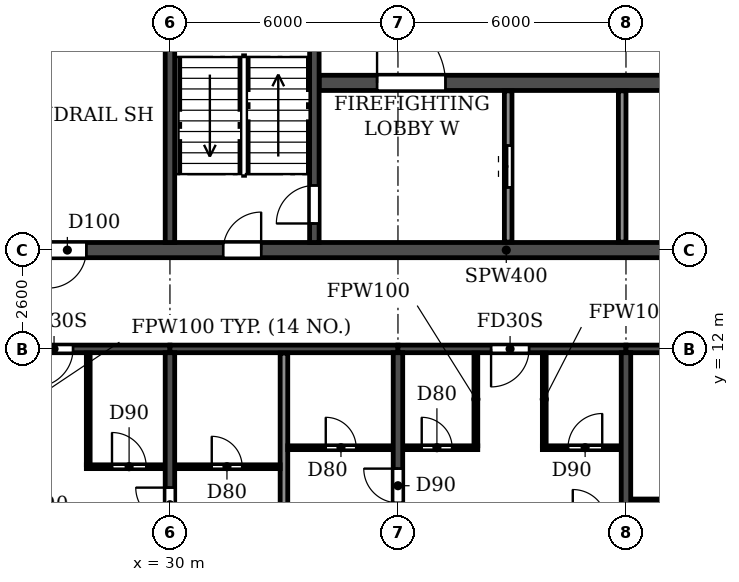
"""IFC4 building model, lengths in metres.
Left out: names, types, materials, properties, quantities, classifications, styles, units other than length and angle.
Written with IfcOpenShell. Run it as: python <this file> out.ifc"""

import sys

from ifc_helpers import new_model, si_unit, direction, frame, frame_2d, origin, place, context, subcontext, project, spatial, rectangle, extrude, element, fill, save


model = new_model("IFC4")
c1 = context("Model", 3, precision=1e-05, world=origin(), true_north=direction((0.0, 1.0)))
c2 = subcontext(c1, "Body", "Model", "MODEL_VIEW")
j1 = project(units=[si_unit("LENGTHUNIT", "METRE"), si_unit("PLANEANGLEUNIT", "RADIAN")], contexts=[c1])
p1 = place(None, origin())
s1 = spatial("IfcSite", under=j1, at=p1, CompositionType="ELEMENT")
p2 = place(p1, origin())
s2 = spatial("IfcBuilding", under=s1, at=p2, CompositionType="ELEMENT")
p3 = place(p2, frame((0.0, 0.0, 208.2)))
s3 = spatial("IfcBuildingStorey", under=s2, at=p3, CompositionType="ELEMENT", Elevation=208.2)
p4 = place(p3, frame((30.0, 0.2, 0.0), z_axis=(0.0, 0.0, 1.0), x_axis=(0.0, 1.0, 0.0)))
e1 = element("IfcWall", 1, at=p4, inside=s3, PredefinedType="SHEAR", context=c2, shape_type="SweptSolid", body=[
    extrude(rectangle(XDim=11.7, YDim=0.25, at=frame_2d((5.85, 0.0))), origin(), (0.0, 0.0, 1.0), 3.0),
])
p5 = place(p4, frame((7.25, 0.0, 0.0)))
e2 = element("IfcOpeningElement", 2, at=p5, cuts=e1, PredefinedType="OPENING", context=c2, shape_type="SweptSolid", body=[
    extrude(rectangle(XDim=0.9, YDim=2.1, at=frame_2d((0.45, 1.05))), frame((0.0, 0.135, 0.0), z_axis=(0.0, -1.0, 0.0), x_axis=(1.0, 0.0, 0.0)), (0.0, 0.0, 1.0), 0.27),
])
p6 = place(p3, frame((36.0, 0.2, 0.0), z_axis=(0.0, 0.0, 1.0), x_axis=(0.0, 1.0, 0.0)))
e3 = element("IfcWall", 3, at=p6, inside=s3, PredefinedType="SHEAR", context=c2, shape_type="SweptSolid", body=[
    extrude(rectangle(XDim=11.7, YDim=0.25, at=frame_2d((5.85, 0.0))), origin(), (0.0, 0.0, 1.0), 3.0),
])
p7 = place(p6, frame((7.75, 0.0, 0.0)))
e4 = element("IfcOpeningElement", 4, at=p7, cuts=e3, PredefinedType="OPENING", context=c2, shape_type="SweptSolid", body=[
    extrude(rectangle(XDim=0.9, YDim=2.1, at=frame_2d((0.45, 1.05))), frame((0.0, 0.135, 0.0), z_axis=(0.0, -1.0, 0.0), x_axis=(1.0, 0.0, 0.0)), (0.0, 0.0, 1.0), 0.27),
])
p8 = place(p3, frame((42.0, 0.2, 0.0), z_axis=(0.0, 0.0, 1.0), x_axis=(0.0, 1.0, 0.0)))
e5 = element("IfcWall", 5, at=p8, inside=s3, PredefinedType="SHEAR", context=c2, shape_type="SweptSolid", body=[
    extrude(rectangle(XDim=11.7, YDim=0.25, at=frame_2d((5.85, 0.0))), origin(), (0.0, 0.0, 1.0), 3.0),
])
p9 = place(p3, frame((24.0, 12.0, 0.0), z_axis=(0.0, 0.0, 1.0), x_axis=(1.0, 0.0, 0.0)))
e6 = element("IfcWall", 6, at=p9, inside=s3, PredefinedType="SHEAR", context=c2, shape_type="SweptSolid", body=[
    extrude(rectangle(XDim=6.0, YDim=0.2, at=frame_2d((3.0, 0.0))), origin(), (0.0, 0.0, 1.0), 2.4),
])
p10 = place(p9, frame((2.45, 0.0, 0.0)))
e7 = element("IfcOpeningElement", 7, at=p10, cuts=e6, PredefinedType="OPENING", context=c2, shape_type="SweptSolid", body=[
    extrude(rectangle(XDim=1.0, YDim=2.1, at=frame_2d((0.5, 1.05))), frame((0.0, 0.11, 0.0), z_axis=(0.0, -1.0, 0.0), x_axis=(1.0, 0.0, 0.0)), (0.0, 0.0, 1.0), 0.22),
])
p11 = place(p3, frame((30.0, 12.0, 0.0), z_axis=(0.0, 0.0, 1.0), x_axis=(1.0, 0.0, 0.0)))
e8 = element("IfcWall", 8, at=p11, inside=s3, PredefinedType="SHEAR", context=c2, shape_type="SweptSolid", body=[
    extrude(rectangle(XDim=6.0, YDim=0.2, at=frame_2d((3.0, 0.0))), origin(), (0.0, 0.0, 1.0), 2.4),
])
p12 = place(p3, frame((36.0, 12.0, 0.0), z_axis=(0.0, 0.0, 1.0), x_axis=(1.0, 0.0, 0.0)))
e9 = element("IfcWall", 9, at=p12, inside=s3, PredefinedType="SHEAR", context=c2, shape_type="SweptSolid", body=[
    extrude(rectangle(XDim=6.0, YDim=0.2, at=frame_2d((3.0, 0.0))), origin(), (0.0, 0.0, 1.0), 2.4),
])
p13 = place(p12, frame((2.45, 0.0, 0.0)))
e10 = element("IfcOpeningElement", 10, at=p13, cuts=e9, PredefinedType="OPENING", context=c2, shape_type="SweptSolid", body=[
    extrude(rectangle(XDim=1.0, YDim=2.1, at=frame_2d((0.5, 1.05))), frame((0.0, 0.11, 0.0), z_axis=(0.0, -1.0, 0.0), x_axis=(1.0, 0.0, 0.0)), (0.0, 0.0, 1.0), 0.22),
])
p14 = place(p3, frame((42.0, 12.0, 0.0), z_axis=(0.0, 0.0, 1.0), x_axis=(1.0, 0.0, 0.0)))
e11 = element("IfcWall", 11, at=p14, inside=s3, PredefinedType="SHEAR", context=c2, shape_type="SweptSolid", body=[
    extrude(rectangle(XDim=6.0, YDim=0.2, at=frame_2d((3.0, 0.0))), origin(), (0.0, 0.0, 1.0), 2.4),
])
p15 = place(p14, frame((2.45, 0.0, 0.0)))
e12 = element("IfcOpeningElement", 12, at=p15, cuts=e11, PredefinedType="OPENING", context=c2, shape_type="SweptSolid", body=[
    extrude(rectangle(XDim=1.0, YDim=2.1, at=frame_2d((0.5, 1.05))), frame((0.0, 0.11, 0.0), z_axis=(0.0, -1.0, 0.0), x_axis=(1.0, 0.0, 0.0)), (0.0, 0.0, 1.0), 0.22),
])
p16 = place(p3, frame((18.2, 14.6, 0.0), z_axis=(0.0, 0.0, 1.0), x_axis=(1.0, 0.0, 0.0)))
e13 = element("IfcWall", 13, at=p16, inside=s3, PredefinedType="SOLIDWALL", context=c2, shape_type="SweptSolid", body=[
    extrude(rectangle(XDim=65.6, YDim=0.4, at=frame_2d((32.8, 0.0))), origin(), (0.0, 0.0, 1.0), 3.0),
])
p17 = place(p16, frame((0.7, 0.0, 0.0)))
e14 = element("IfcOpeningElement", 14, at=p17, cuts=e13, PredefinedType="OPENING", context=c2, shape_type="SweptSolid", body=[
    extrude(rectangle(XDim=1.0, YDim=2.1, at=frame_2d((0.5, 1.05))), frame((0.0, 0.21, 0.0), z_axis=(0.0, -1.0, 0.0), x_axis=(1.0, 0.0, 0.0)), (0.0, 0.0, 1.0), 0.42),
])
p18 = place(p16, frame((8.6, 0.0, 0.0)))
e15 = element("IfcOpeningElement", 15, at=p18, cuts=e13, PredefinedType="OPENING", context=c2, shape_type="SweptSolid", body=[
    extrude(rectangle(XDim=1.0, YDim=2.1, at=frame_2d((0.5, 1.05))), frame((0.0, 0.21, 0.0), z_axis=(0.0, -1.0, 0.0), x_axis=(1.0, 0.0, 0.0)), (0.0, 0.0, 1.0), 0.42),
])
p19 = place(p16, frame((13.2, 0.0, 0.0)))
e16 = element("IfcOpeningElement", 16, at=p19, cuts=e13, PredefinedType="OPENING", context=c2, shape_type="SweptSolid", body=[
    extrude(rectangle(XDim=1.0, YDim=2.1, at=frame_2d((0.5, 1.05))), frame((0.0, 0.21, 0.0), z_axis=(0.0, -1.0, 0.0), x_axis=(1.0, 0.0, 0.0)), (0.0, 0.0, 1.0), 0.42),
])
p20 = place(p16, frame((27.1, 0.0, 0.0)))
e17 = element("IfcOpeningElement", 17, at=p20, cuts=e13, PredefinedType="OPENING", context=c2, shape_type="SweptSolid", body=[
    extrude(rectangle(XDim=1.0, YDim=2.1, at=frame_2d((0.5, 1.05))), frame((0.0, 0.21, 0.0), z_axis=(0.0, -1.0, 0.0), x_axis=(1.0, 0.0, 0.0)), (0.0, 0.0, 1.0), 0.42),
])
p21 = place(p16, frame((32.3, 0.0, 0.0)))
e18 = element("IfcOpeningElement", 18, at=p21, cuts=e13, PredefinedType="OPENING", context=c2, shape_type="SweptSolid", body=[
    extrude(rectangle(XDim=1.0, YDim=2.1, at=frame_2d((0.5, 1.05))), frame((0.0, 0.21, 0.0), z_axis=(0.0, -1.0, 0.0), x_axis=(1.0, 0.0, 0.0)), (0.0, 0.0, 1.0), 0.42),
])
p22 = place(p16, frame((34.9, 0.0, 0.0)))
e19 = element("IfcOpeningElement", 19, at=p22, cuts=e13, PredefinedType="OPENING", context=c2, shape_type="SweptSolid", body=[
    extrude(rectangle(XDim=1.0, YDim=2.1, at=frame_2d((0.5, 1.05))), frame((0.0, 0.21, 0.0), z_axis=(0.0, -1.0, 0.0), x_axis=(1.0, 0.0, 0.0)), (0.0, 0.0, 1.0), 0.42),
])
p23 = place(p16, frame((38.8, 0.0, 0.0)))
e20 = element("IfcOpeningElement", 20, at=p23, cuts=e13, PredefinedType="OPENING", context=c2, shape_type="SweptSolid", body=[
    extrude(rectangle(XDim=1.0, YDim=2.1, at=frame_2d((0.5, 1.05))), frame((0.0, 0.21, 0.0), z_axis=(0.0, -1.0, 0.0), x_axis=(1.0, 0.0, 0.0)), (0.0, 0.0, 1.0), 0.42),
])
p24 = place(p16, frame((51.4, 0.0, 0.0)))
e21 = element("IfcOpeningElement", 21, at=p24, cuts=e13, PredefinedType="OPENING", context=c2, shape_type="SweptSolid", body=[
    extrude(rectangle(XDim=1.0, YDim=2.1, at=frame_2d((0.5, 1.05))), frame((0.0, 0.21, 0.0), z_axis=(0.0, -1.0, 0.0), x_axis=(1.0, 0.0, 0.0)), (0.0, 0.0, 1.0), 0.42),
])
p25 = place(p16, frame((56.0, 0.0, 0.0)))
e22 = element("IfcOpeningElement", 22, at=p25, cuts=e13, PredefinedType="OPENING", context=c2, shape_type="SweptSolid", body=[
    extrude(rectangle(XDim=1.0, YDim=2.1, at=frame_2d((0.5, 1.05))), frame((0.0, 0.21, 0.0), z_axis=(0.0, -1.0, 0.0), x_axis=(1.0, 0.0, 0.0)), (0.0, 0.0, 1.0), 0.42),
])
p26 = place(p16, frame((63.9, 0.0, 0.0)))
e23 = element("IfcOpeningElement", 23, at=p26, cuts=e13, PredefinedType="OPENING", context=c2, shape_type="SweptSolid", body=[
    extrude(rectangle(XDim=1.0, YDim=2.1, at=frame_2d((0.5, 1.05))), frame((0.0, 0.21, 0.0), z_axis=(0.0, -1.0, 0.0), x_axis=(1.0, 0.0, 0.0)), (0.0, 0.0, 1.0), 0.42),
])
p27 = place(p3, frame((33.925, 19.0, 0.0), z_axis=(0.0, 0.0, 1.0), x_axis=(1.0, 0.0, 0.0)))
e24 = element("IfcWall", 24, at=p27, inside=s3, PredefinedType="SOLIDWALL", context=c2, shape_type="SweptSolid", body=[
    extrude(rectangle(XDim=34.15, YDim=0.4, at=frame_2d((17.075, 0.0))), origin(), (0.0, 0.0, 1.0), 3.0),
])
p28 = place(p27, frame((16.175, 0.0, 0.0)))
e25 = element("IfcOpeningElement", 25, at=p28, cuts=e24, PredefinedType="OPENING", context=c2, shape_type="SweptSolid", body=[
    extrude(rectangle(XDim=1.8, YDim=2.1, at=frame_2d((0.9, 1.05))), frame((0.0, 0.21, 0.0), z_axis=(0.0, -1.0, 0.0), x_axis=(1.0, 0.0, 0.0)), (0.0, 0.0, 1.0), 0.42),
])
p29 = place(p27, frame((1.525, 0.0, 0.0)))
e26 = element("IfcOpeningElement", 26, at=p29, cuts=e24, PredefinedType="OPENING", context=c2, shape_type="SweptSolid", body=[
    extrude(rectangle(XDim=1.8, YDim=2.1, at=frame_2d((0.9, 1.05))), frame((0.0, 0.21, 0.0), z_axis=(0.0, -1.0, 0.0), x_axis=(1.0, 0.0, 0.0)), (0.0, 0.0, 1.0), 0.42),
])
p30 = place(p27, frame((30.825, 0.0, 0.0)))
e27 = element("IfcOpeningElement", 27, at=p30, cuts=e24, PredefinedType="OPENING", context=c2, shape_type="SweptSolid", body=[
    extrude(rectangle(XDim=1.8, YDim=2.1, at=frame_2d((0.9, 1.05))), frame((0.0, 0.21, 0.0), z_axis=(0.0, -1.0, 0.0), x_axis=(1.0, 0.0, 0.0)), (0.0, 0.0, 1.0), 0.42),
])
p31 = place(p3, frame((30.0, 14.8, 0.0), z_axis=(0.0, 0.0, 1.0), x_axis=(0.0, 1.0, 0.0)))
e28 = element("IfcWall", 28, at=p31, inside=s3, PredefinedType="SOLIDWALL", context=c2, shape_type="SweptSolid", body=[
    extrude(rectangle(XDim=7.675, YDim=0.25, at=frame_2d((3.837, 0.0))), origin(), (0.0, 0.0, 1.0), 3.0),
])
p32 = place(p3, frame((33.8, 14.8, 0.0), z_axis=(0.0, 0.0, 1.0), x_axis=(0.0, 1.0, 0.0)))
e29 = element("IfcWall", 29, at=p32, inside=s3, PredefinedType="SOLIDWALL", context=c2, shape_type="SweptSolid", body=[
    extrude(rectangle(XDim=7.675, YDim=0.25, at=frame_2d((3.837, 0.0))), origin(), (0.0, 0.0, 1.0), 3.0),
])
p33 = place(p32, frame((0.5, 0.0, 0.0)))
e30 = element("IfcOpeningElement", 30, at=p33, cuts=e29, PredefinedType="OPENING", context=c2, shape_type="SweptSolid", body=[
    extrude(rectangle(XDim=1.0, YDim=2.1, at=frame_2d((0.5, 1.05))), frame((0.0, 0.135, 0.0), z_axis=(0.0, -1.0, 0.0), x_axis=(1.0, 0.0, 0.0)), (0.0, 0.0, 1.0), 0.27),
])
p34 = place(p3, frame((33.0, 0.06, 0.0), z_axis=(0.0, 0.0, 1.0), x_axis=(0.0, 1.0, 0.0)))
e31 = element("IfcWall", 31, at=p34, inside=s3, PredefinedType="PARTITIONING", context=c2, shape_type="SweptSolid", body=[
    extrude(rectangle(XDim=11.83, YDim=0.2, at=frame_2d((5.915, 0.0))), origin(), (0.0, 0.0, 1.0), 3.0),
])
p35 = place(p3, frame((42.135, 8.0, 0.0), z_axis=(0.0, 0.0, 1.0), x_axis=(1.0, 0.0, 0.0)))
e32 = element("IfcWall", 32, at=p35, inside=s3, PredefinedType="PARTITIONING", context=c2, shape_type="SweptSolid", body=[
    extrude(rectangle(XDim=1.965, YDim=0.1, at=frame_2d((0.982, 0.0))), origin(), (0.0, 0.0, 1.0), 3.0),
])
p36 = place(p3, frame((27.8, 8.9, 0.0), z_axis=(0.0, 0.0, 1.0), x_axis=(1.0, 0.0, 0.0)))
e33 = element("IfcWall", 33, at=p36, inside=s3, PredefinedType="PARTITIONING", context=c2, shape_type="SweptSolid", body=[
    extrude(rectangle(XDim=2.065, YDim=0.1, at=frame_2d((1.032, 0.0))), origin(), (0.0, 0.0, 1.0), 3.0),
])
p37 = place(p36, frame((0.675, 0.0, 0.0)))
e34 = element("IfcOpeningElement", 34, at=p37, cuts=e33, PredefinedType="OPENING", context=c2, shape_type="SweptSolid", body=[
    extrude(rectangle(XDim=0.9, YDim=2.1, at=frame_2d((0.45, 1.05))), frame((0.0, 0.06, 0.0), z_axis=(0.0, -1.0, 0.0), x_axis=(1.0, 0.0, 0.0)), (0.0, 0.0, 1.0), 0.12),
])
p38 = place(p3, frame((30.135, 8.9, 0.0), z_axis=(0.0, 0.0, 1.0), x_axis=(1.0, 0.0, 0.0)))
e35 = element("IfcWall", 35, at=p38, inside=s3, PredefinedType="PARTITIONING", context=c2, shape_type="SweptSolid", body=[
    extrude(rectangle(XDim=2.765, YDim=0.1, at=frame_2d((1.382, 0.0))), origin(), (0.0, 0.0, 1.0), 3.0),
])
p39 = place(p38, frame((0.965, 0.0, 0.0)))
e36 = element("IfcOpeningElement", 36, at=p39, cuts=e35, PredefinedType="OPENING", context=c2, shape_type="SweptSolid", body=[
    extrude(rectangle(XDim=0.8, YDim=2.1, at=frame_2d((0.4, 1.05))), frame((0.0, 0.06, 0.0), z_axis=(0.0, -1.0, 0.0), x_axis=(1.0, 0.0, 0.0)), (0.0, 0.0, 1.0), 0.12),
])
p40 = place(p3, frame((33.1, 9.4, 0.0), z_axis=(0.0, 0.0, 1.0), x_axis=(1.0, 0.0, 0.0)))
e37 = element("IfcWall", 37, at=p40, inside=s3, PredefinedType="PARTITIONING", context=c2, shape_type="SweptSolid", body=[
    extrude(rectangle(XDim=2.765, YDim=0.1, at=frame_2d((1.382, 0.0))), origin(), (0.0, 0.0, 1.0), 3.0),
])
p41 = place(p40, frame((1.0, 0.0, 0.0)))
e38 = element("IfcOpeningElement", 38, at=p41, cuts=e37, PredefinedType="OPENING", context=c2, shape_type="SweptSolid", body=[
    extrude(rectangle(XDim=0.8, YDim=2.1, at=frame_2d((0.4, 1.05))), frame((0.0, 0.06, 0.0), z_axis=(0.0, -1.0, 0.0), x_axis=(1.0, 0.0, 0.0)), (0.0, 0.0, 1.0), 0.12),
])
p42 = place(p3, frame((36.135, 9.4, 0.0), z_axis=(0.0, 0.0, 1.0), x_axis=(1.0, 0.0, 0.0)))
e39 = element("IfcWall", 39, at=p42, inside=s3, PredefinedType="PARTITIONING", context=c2, shape_type="SweptSolid", body=[
    extrude(rectangle(XDim=1.965, YDim=0.1, at=frame_2d((0.982, 0.0))), origin(), (0.0, 0.0, 1.0), 3.0),
])
p43 = place(p42, frame((0.49, 0.0, 0.0)))
e40 = element("IfcOpeningElement", 40, at=p43, cuts=e39, PredefinedType="OPENING", context=c2, shape_type="SweptSolid", body=[
    extrude(rectangle(XDim=0.8, YDim=2.1, at=frame_2d((0.4, 1.05))), frame((0.0, 0.06, 0.0), z_axis=(0.0, -1.0, 0.0), x_axis=(1.0, 0.0, 0.0)), (0.0, 0.0, 1.0), 0.12),
])
p44 = place(p3, frame((39.8, 9.4, 0.0), z_axis=(0.0, 0.0, 1.0), x_axis=(1.0, 0.0, 0.0)))
e41 = element("IfcWall", 41, at=p44, inside=s3, PredefinedType="PARTITIONING", context=c2, shape_type="SweptSolid", body=[
    extrude(rectangle(XDim=2.065, YDim=0.1, at=frame_2d((1.032, 0.0))), origin(), (0.0, 0.0, 1.0), 3.0),
])
p45 = place(p44, frame((0.675, 0.0, 0.0)))
e42 = element("IfcOpeningElement", 42, at=p45, cuts=e41, PredefinedType="OPENING", context=c2, shape_type="SweptSolid", body=[
    extrude(rectangle(XDim=0.9, YDim=2.1, at=frame_2d((0.45, 1.05))), frame((0.0, 0.06, 0.0), z_axis=(0.0, -1.0, 0.0), x_axis=(1.0, 0.0, 0.0)), (0.0, 0.0, 1.0), 0.12),
])
p46 = place(p3, frame((27.85, 8.95, 0.0), z_axis=(0.0, 0.0, 1.0), x_axis=(0.0, 1.0, 0.0)))
e43 = element("IfcWall", 43, at=p46, inside=s3, PredefinedType="PARTITIONING", context=c2, shape_type="SweptSolid", body=[
    extrude(rectangle(XDim=2.94, YDim=0.1, at=frame_2d((1.47, 0.0))), origin(), (0.0, 0.0, 1.0), 3.0),
])
for number, where, z_axis, x_axis in (
    (44, (38.05, 9.45, 0.0), (0.0, 0.0, 1.0), (0.0, 1.0, 0.0)),
    (45, (39.85, 9.45, 0.0), (0.0, 0.0, 1.0), (0.0, 1.0, 0.0)),
):
    element("IfcWall", number, at=place(p3, frame(where, z_axis=z_axis, x_axis=x_axis)), inside=s3, PredefinedType="PARTITIONING", context=c2, shape_type="SweptSolid", body=[
        extrude(rectangle(XDim=2.44, YDim=0.1, at=frame_2d((1.22, 0.0))), origin(), (0.0, 0.0, 1.0), 3.0),
    ])
p47 = place(p3, frame((38.9, 14.81, 0.0), z_axis=(0.0, 0.0, 1.0), x_axis=(0.0, 1.0, 0.0)))
e46 = element("IfcWall", 46, at=p47, inside=s3, PredefinedType="PARTITIONING", context=c2, shape_type="SweptSolid", body=[
    extrude(rectangle(XDim=3.98, YDim=0.2, at=frame_2d((1.99, 0.0))), origin(), (0.0, 0.0, 1.0), 3.0),
])
p48 = place(p47, frame((1.44, 0.0, 0.0)))
e47 = element("IfcOpeningElement", 47, at=p48, cuts=e46, PredefinedType="OPENING", context=c2, shape_type="SweptSolid", body=[
    extrude(rectangle(XDim=1.1, YDim=2.1, at=frame_2d((0.55, 1.05))), frame((0.0, 0.11, 0.0), z_axis=(0.0, -1.0, 0.0), x_axis=(1.0, 0.0, 0.0)), (0.0, 0.0, 1.0), 0.22),
])
p49 = place(p3, frame((41.9, 14.81, 0.0), z_axis=(0.0, 0.0, 1.0), x_axis=(0.0, 1.0, 0.0)))
e48 = element("IfcWall", 48, at=p49, inside=s3, PredefinedType="PARTITIONING", context=c2, shape_type="SweptSolid", body=[
    extrude(rectangle(XDim=3.98, YDim=0.2, at=frame_2d((1.99, 0.0))), origin(), (0.0, 0.0, 1.0), 3.0),
])
p50 = place(p18, frame((1.0, 0.0, 0.0), z_axis=(0.0, 0.0, 1.0), x_axis=(-1.0, 0.0, 0.0)))
e49 = element("IfcDoor", 49, at=p50, inside=s3, OperationType="SINGLE_SWING_RIGHT", PredefinedType="DOOR", context=c2, shape_type="SweptSolid", body=[
    extrude(rectangle(XDim=1.0, YDim=2.1, at=frame_2d((0.5, 1.05))), frame((0.0, 0.025, 0.0), z_axis=(0.0, -1.0, 0.0), x_axis=(1.0, 0.0, 0.0)), (0.0, 0.0, 1.0), 0.05),
])
fill(e15, e49)
p51 = place(p19, origin())
e50 = element("IfcDoor", 50, at=p51, inside=s3, OperationType="SINGLE_SWING_RIGHT", PredefinedType="DOOR", context=c2, shape_type="SweptSolid", body=[
    extrude(rectangle(XDim=1.0, YDim=2.1, at=frame_2d((0.5, 1.05))), frame((0.0, 0.025, 0.0), z_axis=(0.0, -1.0, 0.0), x_axis=(1.0, 0.0, 0.0)), (0.0, 0.0, 1.0), 0.05),
])
fill(e16, e50)
p52 = place(p39, origin())
e51 = element("IfcDoor", 51, at=p52, inside=s3, OperationType="SINGLE_SWING_LEFT", PredefinedType="DOOR", context=c2, shape_type="SweptSolid", body=[
    extrude(rectangle(XDim=0.8, YDim=2.1, at=frame_2d((0.4, 1.05))), frame((0.0, 0.025, 0.0), z_axis=(0.0, -1.0, 0.0), x_axis=(1.0, 0.0, 0.0)), (0.0, 0.0, 1.0), 0.05),
])
fill(e36, e51)
p53 = place(p10, frame((1.0, 0.0, 0.0), z_axis=(0.0, 0.0, 1.0), x_axis=(-1.0, 0.0, 0.0)))
e52 = element("IfcDoor", 52, at=p53, inside=s3, OperationType="SINGLE_SWING_RIGHT", PredefinedType="DOOR", context=c2, shape_type="SweptSolid", body=[
    extrude(rectangle(XDim=1.0, YDim=2.1, at=frame_2d((0.5, 1.05))), frame((0.0, 0.025, 0.0), z_axis=(0.0, -1.0, 0.0), x_axis=(1.0, 0.0, 0.0)), (0.0, 0.0, 1.0), 0.05),
])
fill(e7, e52)
p54 = place(p37, origin())
e53 = element("IfcDoor", 53, at=p54, inside=s3, OperationType="SINGLE_SWING_LEFT", PredefinedType="DOOR", context=c2, shape_type="SweptSolid", body=[
    extrude(rectangle(XDim=0.9, YDim=2.1, at=frame_2d((0.45, 1.05))), frame((0.0, 0.025, 0.0), z_axis=(0.0, -1.0, 0.0), x_axis=(1.0, 0.0, 0.0)), (0.0, 0.0, 1.0), 0.05),
])
fill(e34, e53)
p55 = place(p5, origin())
e54 = element("IfcDoor", 54, at=p55, inside=s3, OperationType="SINGLE_SWING_RIGHT", PredefinedType="DOOR", context=c2, shape_type="SweptSolid", body=[
    extrude(rectangle(XDim=0.9, YDim=2.1, at=frame_2d((0.45, 1.05))), frame((0.0, 0.025, 0.0), z_axis=(0.0, -1.0, 0.0), x_axis=(1.0, 0.0, 0.0)), (0.0, 0.0, 1.0), 0.05),
])
fill(e2, e54)
p56 = place(p41, origin())
e55 = element("IfcDoor", 55, at=p56, inside=s3, OperationType="SINGLE_SWING_LEFT", PredefinedType="DOOR", context=c2, shape_type="SweptSolid", body=[
    extrude(rectangle(XDim=0.8, YDim=2.1, at=frame_2d((0.4, 1.05))), frame((0.0, 0.025, 0.0), z_axis=(0.0, -1.0, 0.0), x_axis=(1.0, 0.0, 0.0)), (0.0, 0.0, 1.0), 0.05),
])
fill(e38, e55)
p57 = place(p7, origin())
e56 = element("IfcDoor", 56, at=p57, inside=s3, OperationType="SINGLE_SWING_RIGHT", PredefinedType="DOOR", context=c2, shape_type="SweptSolid", body=[
    extrude(rectangle(XDim=0.9, YDim=2.1, at=frame_2d((0.45, 1.05))), frame((0.0, 0.025, 0.0), z_axis=(0.0, -1.0, 0.0), x_axis=(1.0, 0.0, 0.0)), (0.0, 0.0, 1.0), 0.05),
])
fill(e4, e56)
p58 = place(p43, origin())
e57 = element("IfcDoor", 57, at=p58, inside=s3, OperationType="SINGLE_SWING_LEFT", PredefinedType="DOOR", context=c2, shape_type="SweptSolid", body=[
    extrude(rectangle(XDim=0.8, YDim=2.1, at=frame_2d((0.4, 1.05))), frame((0.0, 0.025, 0.0), z_axis=(0.0, -1.0, 0.0), x_axis=(1.0, 0.0, 0.0)), (0.0, 0.0, 1.0), 0.05),
])
fill(e40, e57)
p59 = place(p13, frame((1.0, 0.0, 0.0), z_axis=(0.0, 0.0, 1.0), x_axis=(-1.0, 0.0, 0.0)))
e58 = element("IfcDoor", 58, at=p59, inside=s3, OperationType="SINGLE_SWING_RIGHT", PredefinedType="DOOR", context=c2, shape_type="SweptSolid", body=[
    extrude(rectangle(XDim=1.0, YDim=2.1, at=frame_2d((0.5, 1.05))), frame((0.0, 0.025, 0.0), z_axis=(0.0, -1.0, 0.0), x_axis=(1.0, 0.0, 0.0)), (0.0, 0.0, 1.0), 0.05),
])
fill(e10, e58)
p60 = place(p45, origin())
e59 = element("IfcDoor", 59, at=p60, inside=s3, OperationType="SINGLE_SWING_RIGHT", PredefinedType="DOOR", context=c2, shape_type="SweptSolid", body=[
    extrude(rectangle(XDim=0.9, YDim=2.1, at=frame_2d((0.45, 1.05))), frame((0.0, 0.025, 0.0), z_axis=(0.0, -1.0, 0.0), x_axis=(1.0, 0.0, 0.0)), (0.0, 0.0, 1.0), 0.05),
])
fill(e42, e59)
p61 = place(p33, origin())
e60 = element("IfcDoor", 60, at=p61, inside=s3, OperationType="SINGLE_SWING_LEFT", PredefinedType="DOOR", context=c2, shape_type="SweptSolid", body=[
    extrude(rectangle(XDim=1.0, YDim=2.1, at=frame_2d((0.5, 1.05))), frame((0.0, 0.025, 0.0), z_axis=(0.0, -1.0, 0.0), x_axis=(1.0, 0.0, 0.0)), (0.0, 0.0, 1.0), 0.05),
])
fill(e30, e60)
p62 = place(p48, origin())
e61 = element("IfcDoor", 61, at=p62, inside=s3, OperationType="DOUBLE_DOOR_SLIDING", PredefinedType="DOOR", context=c2, shape_type="SweptSolid", body=[
    extrude(rectangle(XDim=1.1, YDim=2.1, at=frame_2d((0.55, 1.05))), frame((0.0, 0.025, 0.0), z_axis=(0.0, -1.0, 0.0), x_axis=(1.0, 0.0, 0.0)), (0.0, 0.0, 1.0), 0.05),
])
fill(e47, e61)
p63 = place(p29, origin())
e62 = element("IfcDoor", 62, at=p63, inside=s3, OperationType="DOUBLE_DOOR_SINGLE_SWING", PredefinedType="DOOR", context=c2, shape_type="SweptSolid", body=[
    extrude(rectangle(XDim=1.8, YDim=2.1, at=frame_2d((0.9, 1.05))), frame((0.0, 0.025, 0.0), z_axis=(0.0, -1.0, 0.0), x_axis=(1.0, 0.0, 0.0)), (0.0, 0.0, 1.0), 0.05),
])
fill(e26, e62)
save(model, sys.argv[1])
